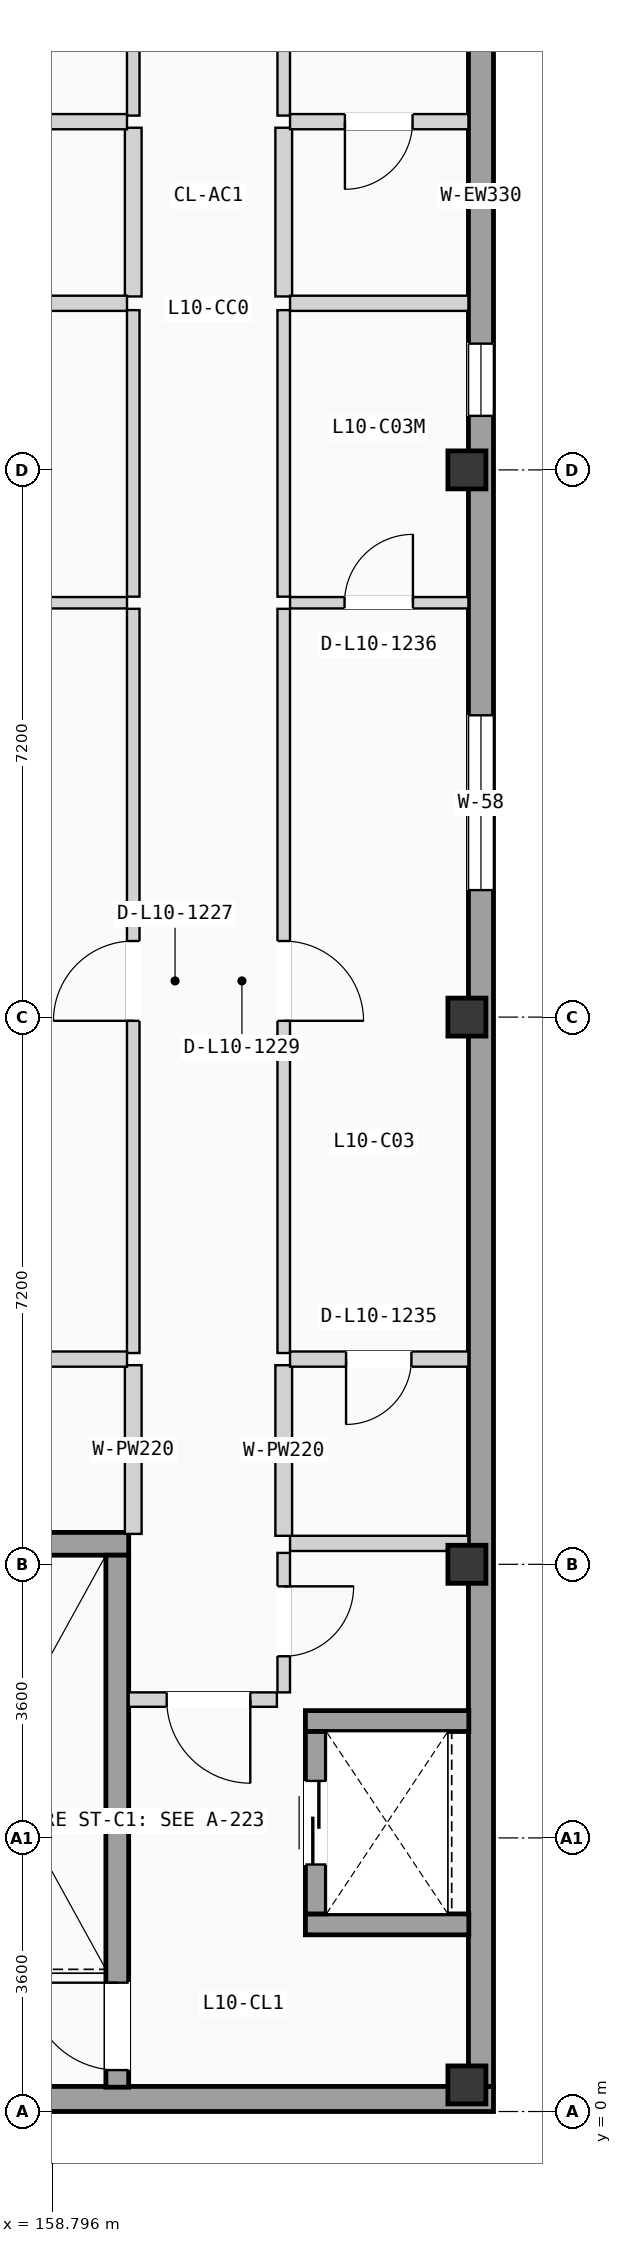
"""IFC4 building model, lengths in metres.
Left out: names, types, materials, properties, quantities, classifications, styles, units other than length and angle.
Written with IfcOpenShell. Run it as: python <this file> out.ifc"""

import sys

from ifc_helpers import new_model, si_unit, direction, frame, frame_2d, origin, origin_2d, place, context, subcontext, project, spatial, rectangle, extrude, element, fill, save


model = new_model("IFC4")
c1 = context("Model", 3, precision=1e-05, world=origin(), true_north=direction((0.0, 1.0)))
c2 = subcontext(c1, "Body", "Model", "MODEL_VIEW")
j1 = project(units=[si_unit("LENGTHUNIT", "METRE"), si_unit("PLANEANGLEUNIT", "RADIAN")], contexts=[c1])
p1 = place(None, origin())
s1 = spatial("IfcSite", under=j1, at=p1, CompositionType="ELEMENT")
p2 = place(p1, origin())
s2 = spatial("IfcBuilding", under=s1, at=p2, CompositionType="ELEMENT")
p3 = place(p2, frame((0.0, 0.0, 34.125)))
s3 = spatial("IfcBuildingStorey", under=s2, at=p3, CompositionType="ELEMENT", Elevation=34.125)
for number, where, z_axis, x_axis in (
    (1, (164.25, 0.35, 0.0), (0.0, 0.0, 1.0), (1.0, 0.0, 0.0)),
    (2, (164.25, 7.2, 0.0), (0.0, 0.0, 1.0), (1.0, 0.0, 0.0)),
    (3, (164.25, 14.4, 0.0), (0.0, 0.0, 1.0), (1.0, 0.0, 0.0)),
    (4, (164.25, 21.6, 0.0), (0.0, 0.0, 1.0), (1.0, 0.0, 0.0)),
):
    element("IfcColumn", number, at=place(p3, frame(where, z_axis=z_axis, x_axis=x_axis)), inside=s3, PredefinedType="COLUMN", context=c2, shape_type="SweptSolid", body=[
        extrude(rectangle(XDim=0.5, YDim=0.5, at=origin_2d()), origin(), (0.0, 0.0, 1.0), 2.85),
    ])
p4 = place(p3, frame((155.8, 0.165, 0.0), z_axis=(0.0, 0.0, 1.0), x_axis=(1.0, 0.0, 0.0)))
e5 = element("IfcWall", 5, at=p4, inside=s3, PredefinedType="SOLIDWALL", context=c2, shape_type="SweptSolid", body=[
    extrude(rectangle(XDim=8.8, YDim=0.33, at=frame_2d((4.4, 0.0))), origin(), (0.0, 0.0, 1.0), 2.55),
])
p5 = place(p3, frame((164.435, 0.33, 0.0), z_axis=(0.0, 0.0, 1.0), x_axis=(0.0, 1.0, 0.0)))
e6 = element("IfcWall", 6, at=p5, inside=s3, PredefinedType="SOLIDWALL", context=c2, shape_type="SweptSolid", body=[
    extrude(rectangle(XDim=49.74, YDim=0.33, at=frame_2d((24.87, 0.0))), origin(), (0.0, 0.0, 1.0), 2.55),
])
p6 = place(p5, frame((15.741, 0.0, 0.665)))
e7 = element("IfcOpeningElement", 7, at=p6, cuts=e6, PredefinedType="OPENING", context=c2, shape_type="SweptSolid", body=[
    extrude(rectangle(XDim=2.3, YDim=1.5, at=frame_2d((1.15, 0.75))), frame((0.0, 0.175, 0.0), z_axis=(0.0, -1.0, 0.0), x_axis=(1.0, 0.0, 0.0)), (0.0, 0.0, 1.0), 0.35),
])
p7 = place(p5, frame((21.981, 0.0, 0.85)))
e8 = element("IfcOpeningElement", 8, at=p7, cuts=e6, PredefinedType="OPENING", context=c2, shape_type="SweptSolid", body=[
    extrude(rectangle(XDim=0.95, YDim=1.2, at=frame_2d((0.475, 0.6))), frame((0.0, 0.175, 0.0), z_axis=(0.0, -1.0, 0.0), x_axis=(1.0, 0.0, 0.0)), (0.0, 0.0, 1.0), 0.35),
])
p8 = place(p5, frame((31.595, 0.0, 0.85)))
e9 = element("IfcOpeningElement", 9, at=p8, cuts=e6, PredefinedType="OPENING", context=c2, shape_type="SweptSolid", body=[
    extrude(rectangle(XDim=0.95, YDim=1.2, at=frame_2d((0.475, 0.6))), frame((0.0, 0.175, 0.0), z_axis=(0.0, -1.0, 0.0), x_axis=(1.0, 0.0, 0.0)), (0.0, 0.0, 1.0), 0.35),
])
p9 = place(p3, frame((156.2, 7.47, 0.0), z_axis=(0.0, 0.0, 1.0), x_axis=(1.0, 0.0, 0.0)))
e10 = element("IfcWall", 10, at=p9, inside=s3, PredefinedType="SHEAR", context=c2, shape_type="SweptSolid", body=[
    extrude(rectangle(XDim=3.6, YDim=0.3, at=frame_2d((1.8, 0.0))), origin(), (0.0, 0.0, 1.0), 2.55),
])
p10 = place(p3, frame((159.65, 0.32, 0.0), z_axis=(0.0, 0.0, 1.0), x_axis=(0.0, 1.0, 0.0)))
e11 = element("IfcWall", 11, at=p10, inside=s3, PredefinedType="SHEAR", context=c2, shape_type="SweptSolid", body=[
    extrude(rectangle(XDim=7.0, YDim=0.3, at=frame_2d((3.5, 0.0))), origin(), (0.0, 0.0, 1.0), 2.55),
])
p11 = place(p10, frame((0.225, 0.0, 0.0)))
e12 = element("IfcOpeningElement", 12, at=p11, cuts=e11, PredefinedType="OPENING", context=c2, shape_type="SweptSolid", body=[
    extrude(rectangle(XDim=1.15, YDim=2.12, at=frame_2d((0.575, 1.06))), frame((0.0, 0.16, 0.0), z_axis=(0.0, -1.0, 0.0), x_axis=(1.0, 0.0, 0.0)), (0.0, 0.0, 1.0), 0.32),
])
for number, where, z_axis, x_axis in (
    (13, (162.125, 2.462, 0.0), (0.0, 0.0, 1.0), (1.0, 0.0, 0.0)),
    (14, (162.125, 5.137, 0.0), (0.0, 0.0, 1.0), (1.0, 0.0, 0.0)),
):
    element("IfcWall", number, at=place(p3, frame(where, z_axis=z_axis, x_axis=x_axis)), inside=s3, PredefinedType="SHEAR", context=c2, shape_type="SweptSolid", body=[
        extrude(rectangle(XDim=2.15, YDim=0.275, at=frame_2d((1.075, 0.0))), origin(), (0.0, 0.0, 1.0), 2.55),
    ])
p12 = place(p3, frame((162.262, 2.6, 0.0), z_axis=(0.0, 0.0, 1.0), x_axis=(0.0, 1.0, 0.0)))
e15 = element("IfcWall", 15, at=p12, inside=s3, PredefinedType="SHEAR", context=c2, shape_type="SweptSolid", body=[
    extrude(rectangle(XDim=2.4, YDim=0.275, at=frame_2d((1.2, 0.0))), origin(), (0.0, 0.0, 1.0), 2.55),
])
p13 = place(p12, frame((0.65, 0.0, 0.0)))
e16 = element("IfcOpeningElement", 16, at=p13, cuts=e15, PredefinedType="OPENING", context=c2, shape_type="SweptSolid", body=[
    extrude(rectangle(XDim=1.1, YDim=2.15, at=frame_2d((0.55, 1.075))), frame((0.0, 0.147, 0.0), z_axis=(0.0, -1.0, 0.0), x_axis=(1.0, 0.0, 0.0)), (0.0, 0.0, 1.0), 0.295),
])
p14 = place(p3, frame((159.8, 5.42, 0.0), z_axis=(0.0, 0.0, 1.0), x_axis=(1.0, 0.0, 0.0)))
e17 = element("IfcWall", 17, at=p14, inside=s3, PredefinedType="PARTITIONING", context=c2, shape_type="SweptSolid", body=[
    extrude(rectangle(XDim=1.95, YDim=0.19, at=frame_2d((0.975, 0.0))), origin(), (0.0, 0.0, 1.0), 2.39),
])
p15 = place(p14, frame((0.5, 0.0, 0.0)))
e18 = element("IfcOpeningElement", 18, at=p15, cuts=e17, PredefinedType="OPENING", context=c2, shape_type="SweptSolid", body=[
    extrude(rectangle(XDim=1.1, YDim=2.12, at=frame_2d((0.55, 1.06))), frame((0.0, 0.105, 0.0), z_axis=(0.0, -1.0, 0.0), x_axis=(1.0, 0.0, 0.0)), (0.0, 0.0, 1.0), 0.21),
])
p16 = place(p3, frame((161.84, 5.515, 0.0), z_axis=(0.0, 0.0, 1.0), x_axis=(0.0, 1.0, 0.0)))
e19 = element("IfcWall", 19, at=p16, inside=s3, PredefinedType="PARTITIONING", context=c2, shape_type="SweptSolid", body=[
    extrude(rectangle(XDim=1.835, YDim=0.165, at=frame_2d((0.917, 0.0))), origin(), (0.0, 0.0, 1.0), 2.39),
])
p17 = place(p16, frame((0.475, 0.0, 0.0)))
e20 = element("IfcOpeningElement", 20, at=p17, cuts=e19, PredefinedType="OPENING", context=c2, shape_type="SweptSolid", body=[
    extrude(rectangle(XDim=0.92, YDim=2.04, at=frame_2d((0.46, 1.02))), frame((0.0, 0.093, 0.0), z_axis=(0.0, -1.0, 0.0), x_axis=(1.0, 0.0, 0.0)), (0.0, 0.0, 1.0), 0.185),
])
p18 = place(p3, frame((161.923, 7.475, 0.0), z_axis=(0.0, 0.0, 1.0), x_axis=(1.0, 0.0, 0.0)))
e21 = element("IfcWall", 21, at=p18, inside=s3, PredefinedType="PLUMBINGWALL", context=c2, shape_type="SweptSolid", body=[
    extrude(rectangle(XDim=2.347, YDim=0.2, at=frame_2d((1.173, 0.0))), origin(), (0.0, 0.0, 1.0), 2.12),
])
p19 = place(p3, frame((159.86, 7.6, 0.0), z_axis=(0.0, 0.0, 1.0), x_axis=(0.0, 1.0, 0.0)))
e22 = element("IfcWall", 22, at=p19, inside=s3, PredefinedType="PLUMBINGWALL", context=c2, shape_type="SweptSolid", body=[
    extrude(rectangle(XDim=2.22, YDim=0.22, at=frame_2d((1.11, 0.0))), origin(), (0.0, 0.0, 1.0), 2.39),
])
p20 = place(p3, frame((159.86, 9.98, 0.0), z_axis=(0.0, 0.0, 1.0), x_axis=(0.0, 1.0, 0.0)))
e23 = element("IfcWall", 23, at=p20, inside=s3, PredefinedType="PARTITIONING", context=c2, shape_type="SweptSolid", body=[
    extrude(rectangle(XDim=9.792, YDim=0.165, at=frame_2d((4.896, 0.0))), origin(), (0.0, 0.0, 1.0), 2.39),
])
p21 = place(p20, frame((4.371, 0.0, 0.0)))
e24 = element("IfcOpeningElement", 24, at=p21, cuts=e23, PredefinedType="OPENING", context=c2, shape_type="SweptSolid", body=[
    extrude(rectangle(XDim=1.05, YDim=2.13, at=frame_2d((0.525, 1.065))), frame((0.0, 0.093, 0.0), z_axis=(0.0, -1.0, 0.0), x_axis=(1.0, 0.0, 0.0)), (0.0, 0.0, 1.0), 0.185),
])
p22 = place(p3, frame((159.86, 19.932, 0.0), z_axis=(0.0, 0.0, 1.0), x_axis=(0.0, 1.0, 0.0)))
e25 = element("IfcWall", 25, at=p22, inside=s3, PredefinedType="PARTITIONING", context=c2, shape_type="SweptSolid", body=[
    extrude(rectangle(XDim=3.77, YDim=0.165, at=frame_2d((1.885, 0.0))), origin(), (0.0, 0.0, 1.0), 2.39),
])
p23 = place(p3, frame((159.86, 23.882, 0.0), z_axis=(0.0, 0.0, 1.0), x_axis=(0.0, 1.0, 0.0)))
e26 = element("IfcWall", 26, at=p23, inside=s3, PredefinedType="PLUMBINGWALL", context=c2, shape_type="SweptSolid", body=[
    extrude(rectangle(XDim=2.22, YDim=0.22, at=frame_2d((1.11, 0.0))), origin(), (0.0, 0.0, 1.0), 2.39),
])
p24 = place(p3, frame((159.86, 26.262, 0.0), z_axis=(0.0, 0.0, 1.0), x_axis=(0.0, 1.0, 0.0)))
e27 = element("IfcWall", 27, at=p24, inside=s3, PredefinedType="PARTITIONING", context=c2, shape_type="SweptSolid", body=[
    extrude(rectangle(XDim=12.608, YDim=0.165, at=frame_2d((6.304, 0.0))), origin(), (0.0, 0.0, 1.0), 2.39),
])
p25 = place(p24, frame((5.779, 0.0, 0.0)))
e28 = element("IfcOpeningElement", 28, at=p25, cuts=e27, PredefinedType="OPENING", context=c2, shape_type="SweptSolid", body=[
    extrude(rectangle(XDim=1.05, YDim=2.13, at=frame_2d((0.525, 1.065))), frame((0.0, 0.093, 0.0), z_axis=(0.0, -1.0, 0.0), x_axis=(1.0, 0.0, 0.0)), (0.0, 0.0, 1.0), 0.185),
])
p26 = place(p3, frame((161.84, 7.575, 0.0), z_axis=(0.0, 0.0, 1.0), x_axis=(0.0, 1.0, 0.0)))
e29 = element("IfcWall", 29, at=p26, inside=s3, PredefinedType="PLUMBINGWALL", context=c2, shape_type="SweptSolid", body=[
    extrude(rectangle(XDim=2.245, YDim=0.22, at=frame_2d((1.123, 0.0))), origin(), (0.0, 0.0, 1.0), 2.39),
])
p27 = place(p3, frame((161.84, 9.98, 0.0), z_axis=(0.0, 0.0, 1.0), x_axis=(0.0, 1.0, 0.0)))
e30 = element("IfcWall", 30, at=p27, inside=s3, PredefinedType="PARTITIONING", context=c2, shape_type="SweptSolid", body=[
    extrude(rectangle(XDim=9.792, YDim=0.165, at=frame_2d((4.896, 0.0))), origin(), (0.0, 0.0, 1.0), 2.39),
])
p28 = place(p27, frame((4.371, 0.0, 0.0)))
e31 = element("IfcOpeningElement", 31, at=p28, cuts=e30, PredefinedType="OPENING", context=c2, shape_type="SweptSolid", body=[
    extrude(rectangle(XDim=1.05, YDim=2.13, at=frame_2d((0.525, 1.065))), frame((0.0, 0.093, 0.0), z_axis=(0.0, -1.0, 0.0), x_axis=(1.0, 0.0, 0.0)), (0.0, 0.0, 1.0), 0.185),
])
p29 = place(p3, frame((161.84, 19.932, 0.0), z_axis=(0.0, 0.0, 1.0), x_axis=(0.0, 1.0, 0.0)))
e32 = element("IfcWall", 32, at=p29, inside=s3, PredefinedType="PARTITIONING", context=c2, shape_type="SweptSolid", body=[
    extrude(rectangle(XDim=3.77, YDim=0.165, at=frame_2d((1.885, 0.0))), origin(), (0.0, 0.0, 1.0), 2.39),
])
p30 = place(p3, frame((161.84, 23.882, 0.0), z_axis=(0.0, 0.0, 1.0), x_axis=(0.0, 1.0, 0.0)))
e33 = element("IfcWall", 33, at=p30, inside=s3, PredefinedType="PLUMBINGWALL", context=c2, shape_type="SweptSolid", body=[
    extrude(rectangle(XDim=2.22, YDim=0.22, at=frame_2d((1.11, 0.0))), origin(), (0.0, 0.0, 1.0), 2.39),
])
p31 = place(p3, frame((161.84, 26.262, 0.0), z_axis=(0.0, 0.0, 1.0), x_axis=(0.0, 1.0, 0.0)))
e34 = element("IfcWall", 34, at=p31, inside=s3, PredefinedType="PARTITIONING", context=c2, shape_type="SweptSolid", body=[
    extrude(rectangle(XDim=12.608, YDim=0.165, at=frame_2d((6.304, 0.0))), origin(), (0.0, 0.0, 1.0), 2.39),
])
p32 = place(p31, frame((5.779, 0.0, 0.0)))
e35 = element("IfcOpeningElement", 35, at=p32, cuts=e34, PredefinedType="OPENING", context=c2, shape_type="SweptSolid", body=[
    extrude(rectangle(XDim=1.05, YDim=2.13, at=frame_2d((0.525, 1.065))), frame((0.0, 0.093, 0.0), z_axis=(0.0, -1.0, 0.0), x_axis=(1.0, 0.0, 0.0)), (0.0, 0.0, 1.0), 0.185),
])
p33 = place(p3, frame((156.13, 9.9, 0.0), z_axis=(0.0, 0.0, 1.0), x_axis=(1.0, 0.0, 0.0)))
e36 = element("IfcWall", 36, at=p33, inside=s3, PredefinedType="PLUMBINGWALL", context=c2, shape_type="SweptSolid", body=[
    extrude(rectangle(XDim=3.648, YDim=0.2, at=frame_2d((1.824, 0.0))), origin(), (0.0, 0.0, 1.0), 2.39),
])
p34 = place(p33, frame((1.4, 0.0, 0.0)))
e37 = element("IfcOpeningElement", 37, at=p34, cuts=e36, PredefinedType="OPENING", context=c2, shape_type="SweptSolid", body=[
    extrude(rectangle(XDim=0.86, YDim=2.0, at=frame_2d((0.43, 1.0))), frame((0.0, 0.11, 0.0), z_axis=(0.0, -1.0, 0.0), x_axis=(1.0, 0.0, 0.0)), (0.0, 0.0, 1.0), 0.22),
])
p35 = place(p3, frame((156.13, 19.852, 0.0), z_axis=(0.0, 0.0, 1.0), x_axis=(1.0, 0.0, 0.0)))
e38 = element("IfcWall", 38, at=p35, inside=s3, PredefinedType="PARTITIONING", context=c2, shape_type="SweptSolid", body=[
    extrude(rectangle(XDim=3.648, YDim=0.15, at=frame_2d((1.824, 0.0))), origin(), (0.0, 0.0, 1.0), 2.39),
])
p36 = place(p35, frame((1.31, 0.0, 0.0)))
e39 = element("IfcOpeningElement", 39, at=p36, cuts=e38, PredefinedType="OPENING", context=c2, shape_type="SweptSolid", body=[
    extrude(rectangle(XDim=1.04, YDim=2.08, at=frame_2d((0.52, 1.04))), frame((0.0, 0.085, 0.0), z_axis=(0.0, -1.0, 0.0), x_axis=(1.0, 0.0, 0.0)), (0.0, 0.0, 1.0), 0.17),
])
p37 = place(p3, frame((156.13, 23.792, 0.0), z_axis=(0.0, 0.0, 1.0), x_axis=(1.0, 0.0, 0.0)))
e40 = element("IfcWall", 40, at=p37, inside=s3, PredefinedType="PLUMBINGWALL", context=c2, shape_type="SweptSolid", body=[
    extrude(rectangle(XDim=3.648, YDim=0.2, at=frame_2d((1.824, 0.0))), origin(), (0.0, 0.0, 1.0), 2.39),
])
p38 = place(p3, frame((156.13, 26.182, 0.0), z_axis=(0.0, 0.0, 1.0), x_axis=(1.0, 0.0, 0.0)))
e41 = element("IfcWall", 41, at=p38, inside=s3, PredefinedType="PLUMBINGWALL", context=c2, shape_type="SweptSolid", body=[
    extrude(rectangle(XDim=3.648, YDim=0.2, at=frame_2d((1.824, 0.0))), origin(), (0.0, 0.0, 1.0), 2.39),
])
p39 = place(p38, frame((1.385, 0.0, 0.0)))
e42 = element("IfcOpeningElement", 42, at=p39, cuts=e41, PredefinedType="OPENING", context=c2, shape_type="SweptSolid", body=[
    extrude(rectangle(XDim=0.89, YDim=2.03, at=frame_2d((0.445, 1.015))), frame((0.0, 0.11, 0.0), z_axis=(0.0, -1.0, 0.0), x_axis=(1.0, 0.0, 0.0)), (0.0, 0.0, 1.0), 0.22),
])
p40 = place(p3, frame((161.923, 9.9, 0.0), z_axis=(0.0, 0.0, 1.0), x_axis=(1.0, 0.0, 0.0)))
e43 = element("IfcWall", 43, at=p40, inside=s3, PredefinedType="PLUMBINGWALL", context=c2, shape_type="SweptSolid", body=[
    extrude(rectangle(XDim=2.347, YDim=0.2, at=frame_2d((1.173, 0.0))), origin(), (0.0, 0.0, 1.0), 2.39),
])
p41 = place(p40, frame((0.737, 0.0, 0.0)))
e44 = element("IfcOpeningElement", 44, at=p41, cuts=e43, PredefinedType="OPENING", context=c2, shape_type="SweptSolid", body=[
    extrude(rectangle(XDim=0.86, YDim=2.0, at=frame_2d((0.43, 1.0))), frame((0.0, 0.11, 0.0), z_axis=(0.0, -1.0, 0.0), x_axis=(1.0, 0.0, 0.0)), (0.0, 0.0, 1.0), 0.22),
])
p42 = place(p3, frame((161.923, 19.852, 0.0), z_axis=(0.0, 0.0, 1.0), x_axis=(1.0, 0.0, 0.0)))
e45 = element("IfcWall", 45, at=p42, inside=s3, PredefinedType="PARTITIONING", context=c2, shape_type="SweptSolid", body=[
    extrude(rectangle(XDim=2.347, YDim=0.15, at=frame_2d((1.173, 0.0))), origin(), (0.0, 0.0, 1.0), 2.39),
])
p43 = place(p42, frame((0.717, 0.0, 0.0)))
e46 = element("IfcOpeningElement", 46, at=p43, cuts=e45, PredefinedType="OPENING", context=c2, shape_type="SweptSolid", body=[
    extrude(rectangle(XDim=0.9, YDim=2.04, at=frame_2d((0.45, 1.02))), frame((0.0, 0.085, 0.0), z_axis=(0.0, -1.0, 0.0), x_axis=(1.0, 0.0, 0.0)), (0.0, 0.0, 1.0), 0.17),
])
p44 = place(p3, frame((161.923, 23.792, 0.0), z_axis=(0.0, 0.0, 1.0), x_axis=(1.0, 0.0, 0.0)))
e47 = element("IfcWall", 47, at=p44, inside=s3, PredefinedType="PLUMBINGWALL", context=c2, shape_type="SweptSolid", body=[
    extrude(rectangle(XDim=2.347, YDim=0.2, at=frame_2d((1.173, 0.0))), origin(), (0.0, 0.0, 1.0), 2.39),
])
p45 = place(p3, frame((161.923, 26.182, 0.0), z_axis=(0.0, 0.0, 1.0), x_axis=(1.0, 0.0, 0.0)))
e48 = element("IfcWall", 48, at=p45, inside=s3, PredefinedType="PLUMBINGWALL", context=c2, shape_type="SweptSolid", body=[
    extrude(rectangle(XDim=2.347, YDim=0.2, at=frame_2d((1.173, 0.0))), origin(), (0.0, 0.0, 1.0), 2.39),
])
p46 = place(p45, frame((0.722, 0.0, 0.0)))
e49 = element("IfcOpeningElement", 49, at=p46, cuts=e48, PredefinedType="OPENING", context=c2, shape_type="SweptSolid", body=[
    extrude(rectangle(XDim=0.89, YDim=2.03, at=frame_2d((0.445, 1.015))), frame((0.0, 0.11, 0.0), z_axis=(0.0, -1.0, 0.0), x_axis=(1.0, 0.0, 0.0)), (0.0, 0.0, 1.0), 0.22),
])
p47 = place(p6, origin())
e50 = element("IfcWindow", 50, at=p47, inside=s3, PartitioningType="DOUBLE_PANEL_VERTICAL", PredefinedType="WINDOW", context=c2, shape_type="SweptSolid", body=[
    extrude(rectangle(XDim=2.3, YDim=1.5, at=frame_2d((1.15, 0.75))), frame((0.0, 0.03, 0.0), z_axis=(0.0, -1.0, 0.0), x_axis=(1.0, 0.0, 0.0)), (0.0, 0.0, 1.0), 0.06),
])
fill(e7, e50)
p48 = place(p7, origin())
e51 = element("IfcWindow", 51, at=p48, inside=s3, PartitioningType="SINGLE_PANEL", PredefinedType="WINDOW", context=c2, shape_type="SweptSolid", body=[
    extrude(rectangle(XDim=0.95, YDim=1.2, at=frame_2d((0.475, 0.6))), frame((0.0, 0.03, 0.0), z_axis=(0.0, -1.0, 0.0), x_axis=(1.0, 0.0, 0.0)), (0.0, 0.0, 1.0), 0.06),
])
fill(e8, e51)
p49 = place(p11, origin())
e52 = element("IfcDoor", 52, at=p49, inside=s3, OperationType="SINGLE_SWING_RIGHT", PredefinedType="DOOR", context=c2, shape_type="SweptSolid", body=[
    extrude(rectangle(XDim=1.15, YDim=2.12, at=frame_2d((0.575, 1.06))), frame((0.0, 0.025, 0.0), z_axis=(0.0, -1.0, 0.0), x_axis=(1.0, 0.0, 0.0)), (0.0, 0.0, 1.0), 0.05),
])
fill(e12, e52)
p50 = place(p13, origin())
e53 = element("IfcDoor", 53, at=p50, inside=s3, OperationType="SLIDING_TO_LEFT", PredefinedType="DOOR", context=c2, shape_type="SweptSolid", body=[
    extrude(rectangle(XDim=1.1, YDim=2.15, at=frame_2d((0.55, 1.075))), frame((0.0, 0.025, 0.0), z_axis=(0.0, -1.0, 0.0), x_axis=(1.0, 0.0, 0.0)), (0.0, 0.0, 1.0), 0.05),
])
fill(e16, e53)
p51 = place(p15, frame((1.1, 0.0, 0.0), z_axis=(0.0, 0.0, 1.0), x_axis=(-1.0, 0.0, 0.0)))
e54 = element("IfcDoor", 54, at=p51, inside=s3, OperationType="SINGLE_SWING_RIGHT", PredefinedType="DOOR", context=c2, shape_type="SweptSolid", body=[
    extrude(rectangle(XDim=1.1, YDim=2.12, at=frame_2d((0.55, 1.06))), frame((0.0, 0.025, 0.0), z_axis=(0.0, -1.0, 0.0), x_axis=(1.0, 0.0, 0.0)), (0.0, 0.0, 1.0), 0.05),
])
fill(e18, e54)
p52 = place(p17, frame((0.92, 0.0, 0.0), z_axis=(0.0, 0.0, 1.0), x_axis=(-1.0, 0.0, 0.0)))
e55 = element("IfcDoor", 55, at=p52, inside=s3, OperationType="SINGLE_SWING_RIGHT", PredefinedType="DOOR", context=c2, shape_type="SweptSolid", body=[
    extrude(rectangle(XDim=0.92, YDim=2.04, at=frame_2d((0.46, 1.02))), frame((0.0, 0.025, 0.0), z_axis=(0.0, -1.0, 0.0), x_axis=(1.0, 0.0, 0.0)), (0.0, 0.0, 1.0), 0.05),
])
fill(e20, e55)
p53 = place(p21, origin())
e56 = element("IfcDoor", 56, at=p53, inside=s3, OperationType="SINGLE_SWING_LEFT", PredefinedType="DOOR", context=c2, shape_type="SweptSolid", body=[
    extrude(rectangle(XDim=1.05, YDim=2.13, at=frame_2d((0.525, 1.065))), frame((0.0, 0.025, 0.0), z_axis=(0.0, -1.0, 0.0), x_axis=(1.0, 0.0, 0.0)), (0.0, 0.0, 1.0), 0.05),
])
fill(e24, e56)
p54 = place(p28, frame((1.05, 0.0, 0.0), z_axis=(0.0, 0.0, 1.0), x_axis=(-1.0, 0.0, 0.0)))
e57 = element("IfcDoor", 57, at=p54, inside=s3, OperationType="SINGLE_SWING_LEFT", PredefinedType="DOOR", context=c2, shape_type="SweptSolid", body=[
    extrude(rectangle(XDim=1.05, YDim=2.13, at=frame_2d((0.525, 1.065))), frame((0.0, 0.025, 0.0), z_axis=(0.0, -1.0, 0.0), x_axis=(1.0, 0.0, 0.0)), (0.0, 0.0, 1.0), 0.05),
])
fill(e31, e57)
p55 = place(p41, frame((0.86, 0.0, 0.0), z_axis=(0.0, 0.0, 1.0), x_axis=(-1.0, 0.0, 0.0)))
e58 = element("IfcDoor", 58, at=p55, inside=s3, OperationType="SINGLE_SWING_LEFT", PredefinedType="DOOR", context=c2, shape_type="SweptSolid", body=[
    extrude(rectangle(XDim=0.86, YDim=2.0, at=frame_2d((0.43, 1.0))), frame((0.0, 0.025, 0.0), z_axis=(0.0, -1.0, 0.0), x_axis=(1.0, 0.0, 0.0)), (0.0, 0.0, 1.0), 0.05),
])
fill(e44, e58)
p56 = place(p43, origin())
e59 = element("IfcDoor", 59, at=p56, inside=s3, OperationType="SINGLE_SWING_RIGHT", PredefinedType="DOOR", context=c2, shape_type="SweptSolid", body=[
    extrude(rectangle(XDim=0.9, YDim=2.04, at=frame_2d((0.45, 1.02))), frame((0.0, 0.025, 0.0), z_axis=(0.0, -1.0, 0.0), x_axis=(1.0, 0.0, 0.0)), (0.0, 0.0, 1.0), 0.05),
])
fill(e46, e59)
p57 = place(p46, frame((0.89, 0.0, 0.0), z_axis=(0.0, 0.0, 1.0), x_axis=(-1.0, 0.0, 0.0)))
e60 = element("IfcDoor", 60, at=p57, inside=s3, OperationType="SINGLE_SWING_LEFT", PredefinedType="DOOR", context=c2, shape_type="SweptSolid", body=[
    extrude(rectangle(XDim=0.89, YDim=2.03, at=frame_2d((0.445, 1.015))), frame((0.0, 0.025, 0.0), z_axis=(0.0, -1.0, 0.0), x_axis=(1.0, 0.0, 0.0)), (0.0, 0.0, 1.0), 0.05),
])
fill(e49, e60)
save(model, sys.argv[1])
